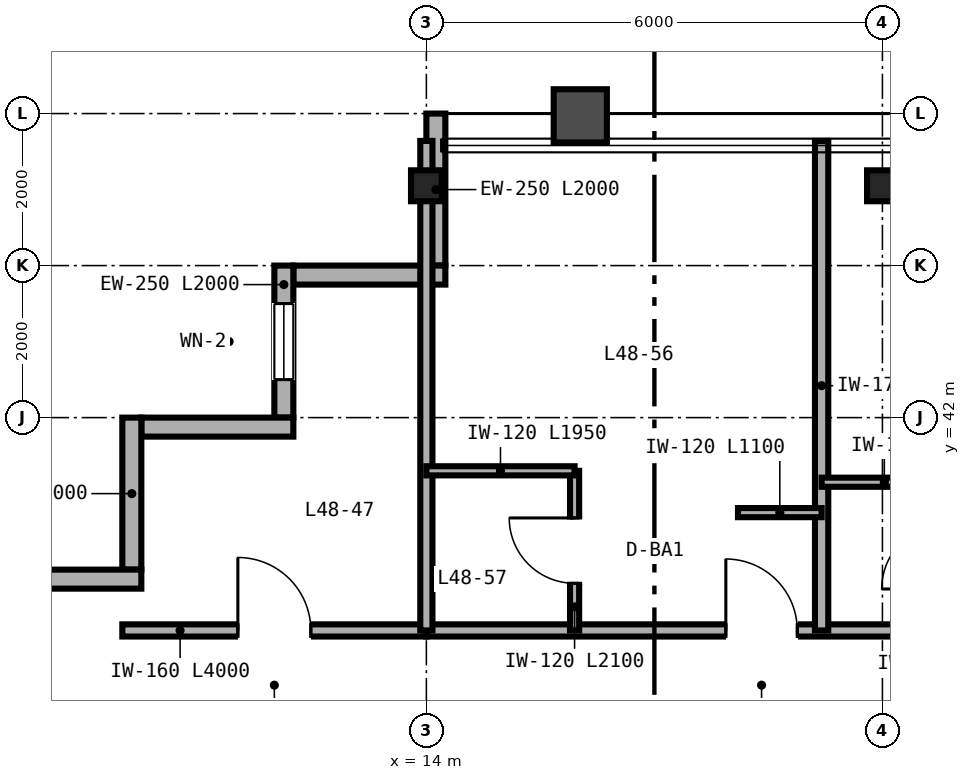
"""IFC4 building model, lengths in metres.
Left out: names, types, materials, properties, quantities, classifications, styles, units other than length and angle.
Written with IfcOpenShell. Run it as: python <this file> out.ifc"""

import sys

from ifc_helpers import new_model, si_unit, direction, frame, frame_2d, origin, origin_2d, place, context, subcontext, project, spatial, rectangle, i_section, extrude, source, transform, mapped, element, fill, save


model = new_model("IFC4")
c1 = context("Model", 3, precision=1e-05, world=origin(), true_north=direction((0.0, 1.0)))
c2 = subcontext(c1, "Body", "Model", "MODEL_VIEW")
j1 = project(units=[si_unit("LENGTHUNIT", "METRE"), si_unit("PLANEANGLEUNIT", "RADIAN")], contexts=[c1])
p1 = place(None, origin())
s1 = spatial("IfcSite", under=j1, at=p1, CompositionType="ELEMENT")
p2 = place(p1, origin())
s2 = spatial("IfcBuilding", under=s1, at=p2, CompositionType="ELEMENT")
p3 = place(p2, frame((0.0, 0.0, 192.0)))
s3 = spatial("IfcBuildingStorey", under=s2, at=p3, CompositionType="ELEMENT", Elevation=192.0)
m1 = source(origin(), c2, "Body", "SweptSolid", [
    extrude(i_section(OverallWidth=0.404, OverallDepth=0.407, WebThickness=0.027, FlangeThickness=0.044, FilletRadius=0.025, at=origin_2d()), origin(), (0.0, 0.0, 1.0), 3.37),
])
for number, where, z_axis, x_axis in (
    (1, (14.0, 45.05, 0.0), (0.0, 0.0, 1.0), (1.0, 0.0, 0.0)),
    (2, (20.0, 45.05, 0.0), (0.0, 0.0, 1.0), (1.0, 0.0, 0.0)),
):
    element("IfcColumn", number, at=place(p3, frame(where, z_axis=z_axis, x_axis=x_axis)), inside=s3, PredefinedType="COLUMN", context=c2, shape_type="MappedRepresentation", body=[
        mapped(m1, transform((0.0, 0.0, 0.0), scale=1.0)),
    ])
p4 = place(p3, frame((14.125, 46.0, 0.0), z_axis=(0.0, 0.0, 1.0), x_axis=(0.0, -1.0, 0.0)))
e3 = element("IfcWall", 3, at=p4, inside=s3, PredefinedType="SOLIDWALL", context=c2, shape_type="SweptSolid", body=[
    extrude(rectangle(XDim=2.0, YDim=0.25, at=frame_2d((1.0, 0.0))), origin(), (0.0, 0.0, 1.0), 2.677),
])
p5 = place(p3, frame((14.25, 43.875, 0.0), z_axis=(0.0, 0.0, 1.0), x_axis=(-1.0, 0.0, 0.0)))
e4 = element("IfcWall", 4, at=p5, inside=s3, PredefinedType="SOLIDWALL", context=c2, shape_type="SweptSolid", body=[
    extrude(rectangle(XDim=2.0, YDim=0.25, at=frame_2d((1.0, 0.0))), origin(), (0.0, 0.0, 1.0), 3.37),
])
p6 = place(p3, frame((12.125, 44.0, 0.0), z_axis=(0.0, 0.0, 1.0), x_axis=(0.0, -1.0, 0.0)))
e5 = element("IfcWall", 5, at=p6, inside=s3, PredefinedType="SOLIDWALL", context=c2, shape_type="SweptSolid", body=[
    extrude(rectangle(XDim=2.0, YDim=0.25, at=frame_2d((1.0, 0.0))), origin(), (0.0, 0.0, 1.0), 3.37),
])
p7 = place(p6, frame((0.5, 0.0, 0.85)))
e6 = element("IfcOpeningElement", 6, at=p7, cuts=e5, PredefinedType="OPENING", context=c2, shape_type="SweptSolid", body=[
    extrude(rectangle(XDim=1.0, YDim=1.9, at=frame_2d((0.5, 0.95))), frame((0.0, 0.135, 0.0), z_axis=(0.0, -1.0, 0.0), x_axis=(1.0, 0.0, 0.0)), (0.0, 0.0, 1.0), 0.27),
])
for number, where, z_axis, x_axis in (
    (7, (12.25, 41.875, 0.0), (0.0, 0.0, 1.0), (-1.0, 0.0, 0.0)),
    (8, (10.125, 42.0, 0.0), (0.0, 0.0, 1.0), (0.0, -1.0, 0.0)),
):
    element("IfcWall", number, at=place(p3, frame(where, z_axis=z_axis, x_axis=x_axis)), inside=s3, PredefinedType="SOLIDWALL", context=c2, shape_type="SweptSolid", body=[
        extrude(rectangle(XDim=2.0, YDim=0.25, at=frame_2d((1.0, 0.0))), origin(), (0.0, 0.0, 1.0), 3.37),
    ])
p8 = place(p3, frame((10.25, 39.875, 0.0), z_axis=(0.0, 0.0, 1.0), x_axis=(-1.0, 0.0, 0.0)))
e9 = element("IfcWall", 9, at=p8, inside=s3, PredefinedType="SOLIDWALL", context=c2, shape_type="SweptSolid", body=[
    extrude(rectangle(XDim=2.25, YDim=0.25, at=frame_2d((1.125, 0.0))), origin(), (0.0, 0.0, 1.0), 3.37),
])
p9 = place(p3, frame((10.0, 39.2, 0.0), z_axis=(0.0, 0.0, 1.0), x_axis=(1.0, 0.0, 0.0)))
e10 = element("IfcWall", 10, at=p9, inside=s3, PredefinedType="PARTITIONING", context=c2, shape_type="SweptSolid", body=[
    extrude(rectangle(XDim=4.0, YDim=0.16, at=frame_2d((2.0, 0.0))), origin(), (0.0, 0.0, 1.0), 3.37),
])
p10 = place(p9, frame((1.52, 0.0, 0.0)))
e11 = element("IfcOpeningElement", 11, at=p10, cuts=e10, PredefinedType="OPENING", context=c2, shape_type="SweptSolid", body=[
    extrude(rectangle(XDim=0.96, YDim=2.15, at=frame_2d((0.48, 1.075))), frame((0.0, 0.09, 0.0), z_axis=(0.0, -1.0, 0.0), x_axis=(1.0, 0.0, 0.0)), (0.0, 0.0, 1.0), 0.18),
])
p11 = place(p3, frame((14.0, 39.2, 0.0), z_axis=(0.0, 0.0, 1.0), x_axis=(1.0, 0.0, 0.0)))
e12 = element("IfcWall", 12, at=p11, inside=s3, PredefinedType="PARTITIONING", context=c2, shape_type="SweptSolid", body=[
    extrude(rectangle(XDim=36.0, YDim=0.16, at=frame_2d((18.0, 0.0))), origin(), (0.0, 0.0, 1.0), 2.913),
])
p12 = place(p11, frame((3.94, 0.0, 0.0)))
e13 = element("IfcOpeningElement", 13, at=p12, cuts=e12, PredefinedType="OPENING", context=c2, shape_type="SweptSolid", body=[
    extrude(rectangle(XDim=0.94, YDim=2.15, at=frame_2d((0.47, 1.075))), frame((0.0, 0.09, 0.0), z_axis=(0.0, -1.0, 0.0), x_axis=(1.0, 0.0, 0.0)), (0.0, 0.0, 1.0), 0.18),
])
p13 = place(p11, frame((9.14, 0.0, 0.0)))
e14 = element("IfcOpeningElement", 14, at=p13, cuts=e12, PredefinedType="OPENING", context=c2, shape_type="SweptSolid", body=[
    extrude(rectangle(XDim=0.94, YDim=2.15, at=frame_2d((0.47, 1.075))), frame((0.0, 0.09, 0.0), z_axis=(0.0, -1.0, 0.0), x_axis=(1.0, 0.0, 0.0)), (0.0, 0.0, 1.0), 0.18),
])
p14 = place(p11, frame((12.72, 0.0, 0.0)))
e15 = element("IfcOpeningElement", 15, at=p14, cuts=e12, PredefinedType="OPENING", context=c2, shape_type="SweptSolid", body=[
    extrude(rectangle(XDim=0.96, YDim=2.15, at=frame_2d((0.48, 1.075))), frame((0.0, 0.09, 0.0), z_axis=(0.0, -1.0, 0.0), x_axis=(1.0, 0.0, 0.0)), (0.0, 0.0, 1.0), 0.18),
])
p15 = place(p11, frame((18.42, 0.0, 0.0)))
e16 = element("IfcOpeningElement", 16, at=p15, cuts=e12, PredefinedType="OPENING", context=c2, shape_type="SweptSolid", body=[
    extrude(rectangle(XDim=0.96, YDim=2.15, at=frame_2d((0.48, 1.075))), frame((0.0, 0.09, 0.0), z_axis=(0.0, -1.0, 0.0), x_axis=(1.0, 0.0, 0.0)), (0.0, 0.0, 1.0), 0.18),
])
p16 = place(p11, frame((26.34, 0.0, 0.0)))
e17 = element("IfcOpeningElement", 17, at=p16, cuts=e12, PredefinedType="OPENING", context=c2, shape_type="SweptSolid", body=[
    extrude(rectangle(XDim=0.94, YDim=2.15, at=frame_2d((0.47, 1.075))), frame((0.0, 0.09, 0.0), z_axis=(0.0, -1.0, 0.0), x_axis=(1.0, 0.0, 0.0)), (0.0, 0.0, 1.0), 0.18),
])
p17 = place(p11, frame((30.54, 0.0, 0.0)))
e18 = element("IfcOpeningElement", 18, at=p17, cuts=e12, PredefinedType="OPENING", context=c2, shape_type="SweptSolid", body=[
    extrude(rectangle(XDim=0.94, YDim=2.15, at=frame_2d((0.47, 1.075))), frame((0.0, 0.09, 0.0), z_axis=(0.0, -1.0, 0.0), x_axis=(1.0, 0.0, 0.0)), (0.0, 0.0, 1.0), 0.18),
])
p18 = place(p11, frame((34.74, 0.0, 0.0)))
e19 = element("IfcOpeningElement", 19, at=p18, cuts=e12, PredefinedType="OPENING", context=c2, shape_type="SweptSolid", body=[
    extrude(rectangle(XDim=0.94, YDim=2.15, at=frame_2d((0.47, 1.075))), frame((0.0, 0.09, 0.0), z_axis=(0.0, -1.0, 0.0), x_axis=(1.0, 0.0, 0.0)), (0.0, 0.0, 1.0), 0.18),
])
p19 = place(p3, frame((14.0, 39.2, 0.0), z_axis=(0.0, 0.0, 1.0), x_axis=(0.0, 1.0, 0.0)))
e20 = element("IfcWall", 20, at=p19, inside=s3, PredefinedType="PARTITIONING", context=c2, shape_type="SweptSolid", body=[
    extrude(rectangle(XDim=6.44, YDim=0.16, at=frame_2d((3.22, 0.0))), origin(), (0.0, 0.0, 1.0), 2.677),
])
p20 = place(p3, frame((19.2, 39.2, 0.0), z_axis=(0.0, 0.0, 1.0), x_axis=(0.0, 1.0, 0.0)))
e21 = element("IfcWall", 21, at=p20, inside=s3, PredefinedType="PARTITIONING", context=c2, shape_type="SweptSolid", body=[
    extrude(rectangle(XDim=6.44, YDim=0.175, at=frame_2d((3.22, 0.0))), origin(), (0.0, 0.0, 1.0), 2.677),
])
p21 = place(p3, frame((15.95, 39.2, 0.0), z_axis=(0.0, 0.0, 1.0), x_axis=(0.0, 1.0, 0.0)))
e22 = element("IfcWall", 22, at=p21, inside=s3, PredefinedType="PARTITIONING", context=c2, shape_type="SweptSolid", body=[
    extrude(rectangle(XDim=2.1, YDim=0.12, at=frame_2d((1.05, 0.0))), origin(), (0.0, 0.0, 1.0), 3.37),
])
p22 = place(p21, frame((0.62, 0.0, 0.0)))
e23 = element("IfcOpeningElement", 23, at=p22, cuts=e22, PredefinedType="OPENING", context=c2, shape_type="SweptSolid", body=[
    extrude(rectangle(XDim=0.86, YDim=2.1, at=frame_2d((0.43, 1.05))), frame((0.0, 0.07, 0.0), z_axis=(0.0, -1.0, 0.0), x_axis=(1.0, 0.0, 0.0)), (0.0, 0.0, 1.0), 0.14),
])
p23 = place(p3, frame((14.0, 41.3, 0.0), z_axis=(0.0, 0.0, 1.0), x_axis=(1.0, 0.0, 0.0)))
e24 = element("IfcWall", 24, at=p23, inside=s3, PredefinedType="PARTITIONING", context=c2, shape_type="SweptSolid", body=[
    extrude(rectangle(XDim=1.95, YDim=0.12, at=frame_2d((0.975, 0.0))), origin(), (0.0, 0.0, 1.0), 3.37),
])
p24 = place(p3, frame((18.1, 40.75, 0.0), z_axis=(0.0, 0.0, 1.0), x_axis=(1.0, 0.0, 0.0)))
e25 = element("IfcWall", 25, at=p24, inside=s3, PredefinedType="PARTITIONING", context=c2, shape_type="SweptSolid", body=[
    extrude(rectangle(XDim=1.1, YDim=0.12, at=frame_2d((0.55, 0.0))), origin(), (0.0, 0.0, 1.0), 3.37),
])
p25 = place(p3, frame((19.2, 41.15, 0.0), z_axis=(0.0, 0.0, 1.0), x_axis=(1.0, 0.0, 0.0)))
e26 = element("IfcWall", 26, at=p25, inside=s3, PredefinedType="PARTITIONING", context=c2, shape_type="SweptSolid", body=[
    extrude(rectangle(XDim=1.65, YDim=0.12, at=frame_2d((0.825, 0.0))), origin(), (0.0, 0.0, 1.0), 3.37),
])
m2 = source(origin(), c2, "Body", "SweptSolid", [
    extrude(rectangle(XDim=1.0, YDim=1.9, at=frame_2d((0.5, 0.95))), frame((0.0, 0.03, 0.0), z_axis=(0.0, -1.0, 0.0), x_axis=(1.0, 0.0, 0.0)), (0.0, 0.0, 1.0), 0.06),
])
p26 = place(p7, origin())
e27 = element("IfcWindow", 27, at=p26, inside=s3, PartitioningType="SINGLE_PANEL", PredefinedType="WINDOW", context=c2, shape_type="MappedRepresentation", body=[
    mapped(m2, transform((0.0, 0.0, 0.0), scale=1.0)),
])
fill(e6, e27)
m3 = source(origin(), c2, "Body", "SweptSolid", [
    extrude(rectangle(XDim=0.96, YDim=2.15, at=frame_2d((0.48, 1.075))), frame((0.0, 0.025, 0.0), z_axis=(0.0, -1.0, 0.0), x_axis=(1.0, 0.0, 0.0)), (0.0, 0.0, 1.0), 0.05),
])
p27 = place(p10, origin())
e28 = element("IfcDoor", 28, at=p27, inside=s3, OperationType="SINGLE_SWING_LEFT", PredefinedType="DOOR", context=c2, shape_type="MappedRepresentation", body=[
    mapped(m3, transform((0.0, 0.0, 0.0), scale=1.0)),
])
fill(e11, e28)
m4 = source(origin(), c2, "Body", "SweptSolid", [
    extrude(rectangle(XDim=0.86, YDim=2.1, at=frame_2d((0.43, 1.05))), frame((0.0, 0.025, 0.0), z_axis=(0.0, -1.0, 0.0), x_axis=(1.0, 0.0, 0.0)), (0.0, 0.0, 1.0), 0.05),
])
p28 = place(p22, origin())
e29 = element("IfcDoor", 29, at=p28, inside=s3, OperationType="SINGLE_SWING_RIGHT", PredefinedType="DOOR", context=c2, shape_type="MappedRepresentation", body=[
    mapped(m4, transform((0.0, 0.0, 0.0), scale=1.0)),
])
fill(e23, e29)
m5 = source(origin(), c2, "Body", "SweptSolid", [
    extrude(rectangle(XDim=0.94, YDim=2.15, at=frame_2d((0.47, 1.075))), frame((0.0, 0.025, 0.0), z_axis=(0.0, -1.0, 0.0), x_axis=(1.0, 0.0, 0.0)), (0.0, 0.0, 1.0), 0.05),
])
p29 = place(p12, origin())
e30 = element("IfcDoor", 30, at=p29, inside=s3, OperationType="SINGLE_SWING_LEFT", PredefinedType="DOOR", context=c2, shape_type="MappedRepresentation", body=[
    mapped(m5, transform((0.0, 0.0, 0.0), scale=1.0)),
])
fill(e13, e30)
save(model, sys.argv[1])
